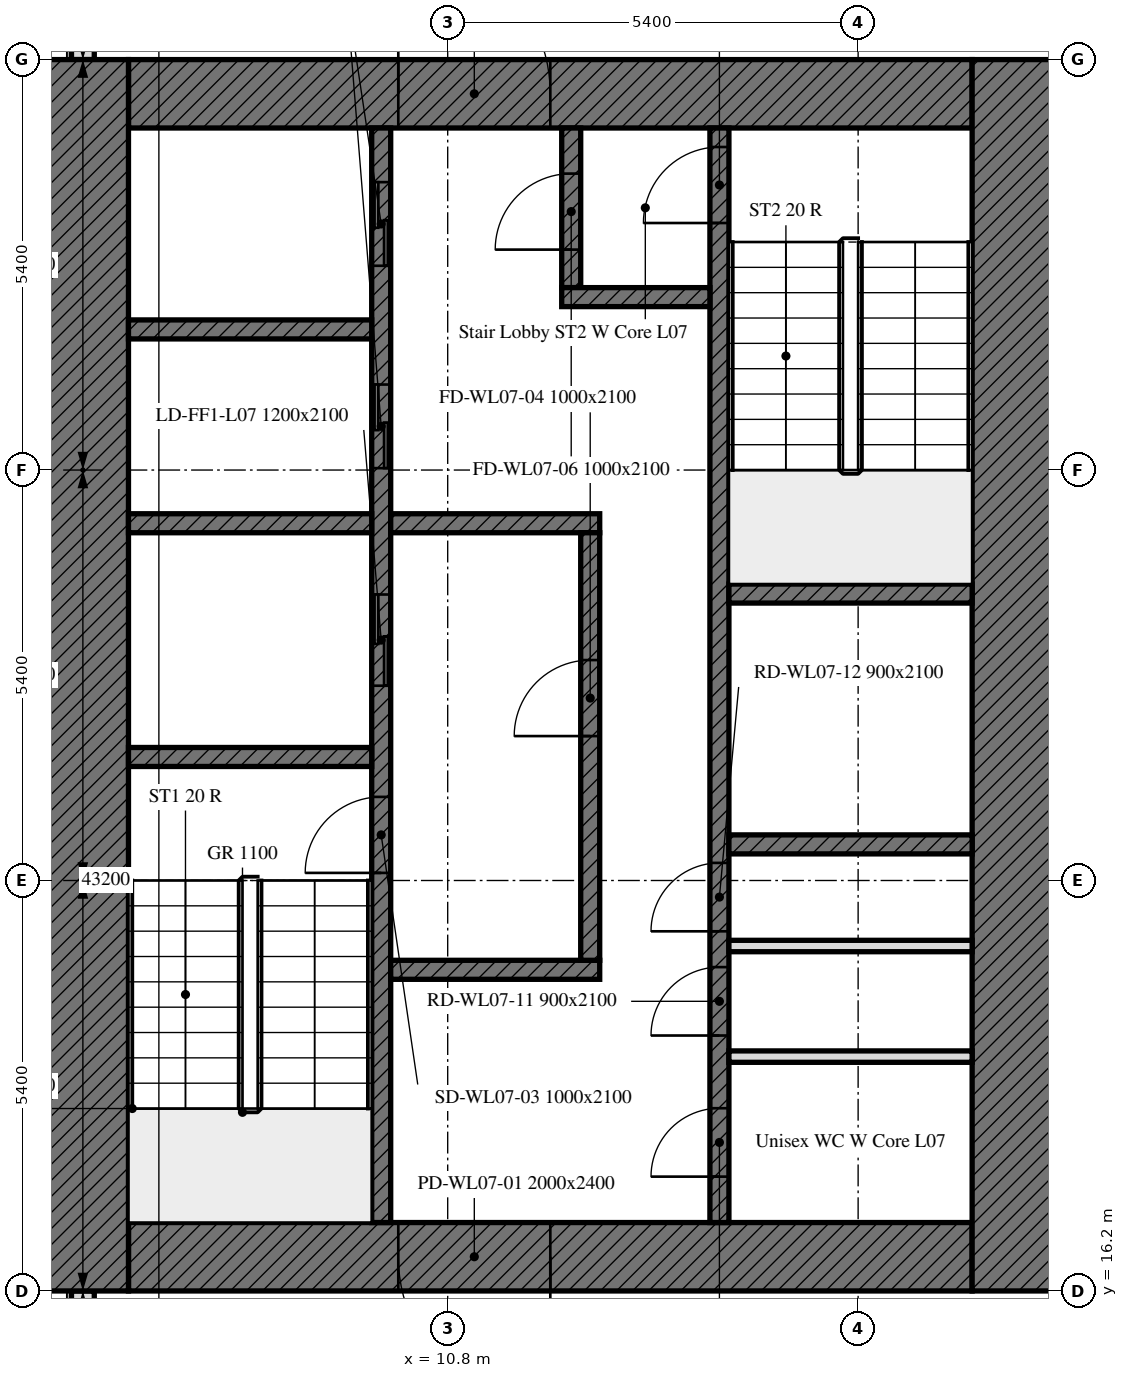
"""IFC4 building model, lengths in metres.
Left out: names, types, materials, properties, quantities, classifications, styles, units other than length and angle.
Written with IfcOpenShell. Run it as: python <this file> out.ifc"""

import sys

from ifc_helpers import new_model, si_unit, direction, frame, frame_2d, origin, place, context, subcontext, project, spatial, rectangle, extrude, element, fill, save


model = new_model("IFC4")
c1 = context("Model", 3, precision=1e-05, world=origin(), true_north=direction((0.0, 1.0)))
c2 = subcontext(c1, "Body", "Model", "MODEL_VIEW")
j1 = project(units=[si_unit("LENGTHUNIT", "METRE"), si_unit("PLANEANGLEUNIT", "RADIAN")], contexts=[c1])
p1 = place(None, origin())
s1 = spatial("IfcSite", under=j1, at=p1, CompositionType="ELEMENT")
p2 = place(p1, origin())
s2 = spatial("IfcBuilding", under=s1, at=p2, CompositionType="ELEMENT")
p3 = place(p2, frame((0.0, 0.0, 37.4)))
s3 = spatial("IfcBuildingStorey", under=s2, at=p3, CompositionType="ELEMENT", Elevation=37.4)
p4 = place(p3, frame((6.0, 37.614, 0.0), z_axis=(0.0, 0.0, 1.0), x_axis=(0.0, -1.0, 0.0)))
e1 = element("IfcWall", 1, at=p4, inside=s3, PredefinedType="SOLIDWALL", context=c2, shape_type="SweptSolid", body=[
    extrude(rectangle(XDim=5.214, YDim=0.3, at=frame_2d((2.607, 0.0))), origin(), (0.0, 0.0, 1.0), 3.5),
])
p5 = place(p3, frame((6.0, 16.2, 0.0), z_axis=(0.0, 0.0, 1.0), x_axis=(0.0, -1.0, 0.0)))
e2 = element("IfcWall", 2, at=p5, inside=s3, PredefinedType="SOLIDWALL", context=c2, shape_type="SweptSolid", body=[
    extrude(rectangle(XDim=10.614, YDim=0.3, at=frame_2d((5.307, 0.0))), origin(), (0.0, 0.0, 1.0), 3.5),
])
p6 = place(p5, frame((6.4, 0.0, 0.9)))
e3 = element("IfcOpeningElement", 3, at=p6, cuts=e2, PredefinedType="OPENING", context=c2, shape_type="SweptSolid", body=[
    extrude(rectangle(XDim=3.4, YDim=1.7, at=frame_2d((1.7, 0.85))), frame((0.0, 0.16, 0.0), z_axis=(0.0, -1.0, 0.0), x_axis=(1.0, 0.0, 0.0)), (0.0, 0.0, 1.0), 0.32),
])
p7 = place(p3, frame((17.7, 16.65, 0.0), z_axis=(0.0, 0.0, 1.0), x_axis=(-1.0, 0.0, 0.0)))
e4 = element("IfcWall", 4, at=p7, inside=s3, PredefinedType="SOLIDWALL", context=c2, shape_type="SweptSolid", body=[
    extrude(rectangle(XDim=11.1, YDim=0.9, at=frame_2d((5.55, 0.0))), origin(), (0.0, 0.0, 1.0), 3.5),
])
p8 = place(p7, frame((5.55, 0.0, 0.0)))
e5 = element("IfcOpeningElement", 5, at=p8, cuts=e4, PredefinedType="OPENING", context=c2, shape_type="SweptSolid", body=[
    extrude(rectangle(XDim=2.0, YDim=2.4, at=frame_2d((1.0, 1.2))), frame((0.0, 0.45, 0.0), z_axis=(0.0, -1.0, 0.0), x_axis=(1.0, 0.0, 0.0)), (0.0, 0.0, 1.0), 0.9),
])
p9 = place(p3, frame((6.6, 31.95, 0.0), z_axis=(0.0, 0.0, 1.0), x_axis=(1.0, 0.0, 0.0)))
e6 = element("IfcWall", 6, at=p9, inside=s3, PredefinedType="SOLIDWALL", context=c2, shape_type="SweptSolid", body=[
    extrude(rectangle(XDim=11.1, YDim=0.9, at=frame_2d((5.55, 0.0))), origin(), (0.0, 0.0, 1.0), 3.5),
])
p10 = place(p9, frame((3.55, 0.0, 0.0)))
e7 = element("IfcOpeningElement", 7, at=p10, cuts=e6, PredefinedType="OPENING", context=c2, shape_type="SweptSolid", body=[
    extrude(rectangle(XDim=2.0, YDim=2.4, at=frame_2d((1.0, 1.2))), frame((0.0, 0.45, 0.0), z_axis=(0.0, -1.0, 0.0), x_axis=(1.0, 0.0, 0.0)), (0.0, 0.0, 1.0), 0.9),
])
for number, where, z_axis, x_axis in (
    (8, (6.0, 16.2, 0.0), (0.0, 0.0, 1.0), (0.0, 1.0, 0.0)),
    (9, (18.3, 32.4, 0.0), (0.0, 0.0, 1.0), (0.0, -1.0, 0.0)),
):
    element("IfcWall", number, at=place(p3, frame(where, z_axis=z_axis, x_axis=x_axis)), inside=s3, PredefinedType="SOLIDWALL", context=c2, shape_type="SweptSolid", body=[
        extrude(rectangle(XDim=16.2, YDim=1.2, at=frame_2d((8.1, 0.0))), origin(), (0.0, 0.0, 1.0), 3.5),
    ])
p11 = place(p3, frame((9.925, 17.1, 0.0), z_axis=(0.0, 0.0, 1.0), x_axis=(0.0, 1.0, 0.0)))
e10 = element("IfcWall", 10, at=p11, inside=s3, PredefinedType="SOLIDWALL", context=c2, shape_type="SweptSolid", body=[
    extrude(rectangle(XDim=14.4, YDim=0.25, at=frame_2d((7.2, 0.0))), origin(), (0.0, 0.0, 1.0), 3.5),
])
p12 = place(p11, frame((4.6, 0.0, 0.0)))
e11 = element("IfcOpeningElement", 11, at=p12, cuts=e10, PredefinedType="OPENING", context=c2, shape_type="SweptSolid", body=[
    extrude(rectangle(XDim=1.0, YDim=2.1, at=frame_2d((0.5, 1.05))), frame((0.0, 0.125, 0.0), z_axis=(0.0, -1.0, 0.0), x_axis=(1.0, 0.0, 0.0)), (0.0, 0.0, 1.0), 0.25),
])
p13 = place(p11, frame((7.062, 0.0, 0.0)))
e12 = element("IfcOpeningElement", 12, at=p13, cuts=e10, PredefinedType="OPENING", context=c2, shape_type="SweptSolid", body=[
    extrude(rectangle(XDim=1.2, YDim=2.1, at=frame_2d((0.6, 1.05))), frame((0.0, 0.125, 0.0), z_axis=(0.0, -1.0, 0.0), x_axis=(1.0, 0.0, 0.0)), (0.0, 0.0, 1.0), 0.25),
])
p14 = place(p11, frame((9.925, 0.0, 0.0)))
e13 = element("IfcOpeningElement", 13, at=p14, cuts=e10, PredefinedType="OPENING", context=c2, shape_type="SweptSolid", body=[
    extrude(rectangle(XDim=1.1, YDim=2.1, at=frame_2d((0.55, 1.05))), frame((0.0, 0.125, 0.0), z_axis=(0.0, -1.0, 0.0), x_axis=(1.0, 0.0, 0.0)), (0.0, 0.0, 1.0), 0.25),
])
p15 = place(p11, frame((12.587, 0.0, 0.0)))
e14 = element("IfcOpeningElement", 14, at=p15, cuts=e10, PredefinedType="OPENING", context=c2, shape_type="SweptSolid", body=[
    extrude(rectangle(XDim=1.1, YDim=2.1, at=frame_2d((0.55, 1.05))), frame((0.0, 0.125, 0.0), z_axis=(0.0, -1.0, 0.0), x_axis=(1.0, 0.0, 0.0)), (0.0, 0.0, 1.0), 0.25),
])
p16 = place(p3, frame((14.375, 17.1, 0.0), z_axis=(0.0, 0.0, 1.0), x_axis=(0.0, 1.0, 0.0)))
e15 = element("IfcWall", 15, at=p16, inside=s3, PredefinedType="SOLIDWALL", context=c2, shape_type="SweptSolid", body=[
    extrude(rectangle(XDim=14.4, YDim=0.25, at=frame_2d((7.2, 0.0))), origin(), (0.0, 0.0, 1.0), 3.5),
])
p17 = place(p16, frame((13.15, 0.0, 0.0)))
e16 = element("IfcOpeningElement", 16, at=p17, cuts=e15, PredefinedType="OPENING", context=c2, shape_type="SweptSolid", body=[
    extrude(rectangle(XDim=1.0, YDim=2.1, at=frame_2d((0.5, 1.05))), frame((0.0, 0.125, 0.0), z_axis=(0.0, -1.0, 0.0), x_axis=(1.0, 0.0, 0.0)), (0.0, 0.0, 1.0), 0.25),
])
p18 = place(p16, frame((0.604, 0.0, 0.0)))
e17 = element("IfcOpeningElement", 17, at=p18, cuts=e15, PredefinedType="OPENING", context=c2, shape_type="SweptSolid", body=[
    extrude(rectangle(XDim=0.9, YDim=2.1, at=frame_2d((0.45, 1.05))), frame((0.0, 0.125, 0.0), z_axis=(0.0, -1.0, 0.0), x_axis=(1.0, 0.0, 0.0)), (0.0, 0.0, 1.0), 0.25),
])
p19 = place(p16, frame((2.46, 0.0, 0.0)))
e18 = element("IfcOpeningElement", 18, at=p19, cuts=e15, PredefinedType="OPENING", context=c2, shape_type="SweptSolid", body=[
    extrude(rectangle(XDim=0.9, YDim=2.1, at=frame_2d((0.45, 1.05))), frame((0.0, 0.125, 0.0), z_axis=(0.0, -1.0, 0.0), x_axis=(1.0, 0.0, 0.0)), (0.0, 0.0, 1.0), 0.25),
])
p20 = place(p16, frame((3.832, 0.0, 0.0)))
e19 = element("IfcOpeningElement", 19, at=p20, cuts=e15, PredefinedType="OPENING", context=c2, shape_type="SweptSolid", body=[
    extrude(rectangle(XDim=0.9, YDim=2.1, at=frame_2d((0.45, 1.05))), frame((0.0, 0.125, 0.0), z_axis=(0.0, -1.0, 0.0), x_axis=(1.0, 0.0, 0.0)), (0.0, 0.0, 1.0), 0.25),
])
for number, where, z_axis, x_axis in (
    (20, (6.6, 23.225, 0.0), (0.0, 0.0, 1.0), (1.0, 0.0, 0.0)),
    (21, (14.5, 25.375, 0.0), (0.0, 0.0, 1.0), (1.0, 0.0, 0.0)),
    (22, (14.5, 22.075, 0.0), (0.0, 0.0, 1.0), (1.0, 0.0, 0.0)),
    (23, (6.6, 26.3, 0.0), (0.0, 0.0, 1.0), (1.0, 0.0, 0.0)),
):
    element("IfcWall", number, at=place(p3, frame(where, z_axis=z_axis, x_axis=x_axis)), inside=s3, PredefinedType="SOLIDWALL", context=c2, shape_type="SweptSolid", body=[
        extrude(rectangle(XDim=3.2, YDim=0.25, at=frame_2d((1.6, 0.0))), origin(), (0.0, 0.0, 1.0), 3.5),
    ])
for number, where, z_axis, x_axis in (
    (24, (10.05, 26.3, 0.0), (0.0, 0.0, 1.0), (1.0, 0.0, 0.0)),
    (25, (10.05, 20.425, 0.0), (0.0, 0.0, 1.0), (1.0, 0.0, 0.0)),
):
    element("IfcWall", number, at=place(p3, frame(where, z_axis=z_axis, x_axis=x_axis)), inside=s3, PredefinedType="SOLIDWALL", context=c2, shape_type="SweptSolid", body=[
        extrude(rectangle(XDim=2.75, YDim=0.25, at=frame_2d((1.375, 0.0))), origin(), (0.0, 0.0, 1.0), 3.5),
    ])
p21 = place(p3, frame((12.425, 29.4, 0.0), z_axis=(0.0, 0.0, 1.0), x_axis=(0.0, 1.0, 0.0)))
e26 = element("IfcWall", 26, at=p21, inside=s3, PredefinedType="SOLIDWALL", context=c2, shape_type="SweptSolid", body=[
    extrude(rectangle(XDim=2.1, YDim=0.25, at=frame_2d((1.05, 0.0))), origin(), (0.0, 0.0, 1.0), 3.5),
])
p22 = place(p21, frame((0.5, 0.0, 0.0)))
e27 = element("IfcOpeningElement", 27, at=p22, cuts=e26, PredefinedType="OPENING", context=c2, shape_type="SweptSolid", body=[
    extrude(rectangle(XDim=1.0, YDim=2.1, at=frame_2d((0.5, 1.05))), frame((0.0, 0.125, 0.0), z_axis=(0.0, -1.0, 0.0), x_axis=(1.0, 0.0, 0.0)), (0.0, 0.0, 1.0), 0.25),
])
p23 = place(p3, frame((12.3, 29.275, 0.0), z_axis=(0.0, 0.0, 1.0), x_axis=(1.0, 0.0, 0.0)))
e28 = element("IfcWall", 28, at=p23, inside=s3, PredefinedType="SOLIDWALL", context=c2, shape_type="SweptSolid", body=[
    extrude(rectangle(XDim=1.95, YDim=0.25, at=frame_2d((0.975, 0.0))), origin(), (0.0, 0.0, 1.0), 3.5),
])
p24 = place(p3, frame((12.675, 20.55, 0.0), z_axis=(0.0, 0.0, 1.0), x_axis=(0.0, 1.0, 0.0)))
e29 = element("IfcWall", 29, at=p24, inside=s3, PredefinedType="SOLIDWALL", context=c2, shape_type="SweptSolid", body=[
    extrude(rectangle(XDim=5.625, YDim=0.25, at=frame_2d((2.812, 0.0))), origin(), (0.0, 0.0, 1.0), 3.5),
])
p25 = place(p24, frame((2.95, 0.0, 0.0)))
e30 = element("IfcOpeningElement", 30, at=p25, cuts=e29, PredefinedType="OPENING", context=c2, shape_type="SweptSolid", body=[
    extrude(rectangle(XDim=1.0, YDim=2.1, at=frame_2d((0.5, 1.05))), frame((0.0, 0.125, 0.0), z_axis=(0.0, -1.0, 0.0), x_axis=(1.0, 0.0, 0.0)), (0.0, 0.0, 1.0), 0.25),
])
p26 = place(p3, frame((6.6, 28.85, 0.0), z_axis=(0.0, 0.0, 1.0), x_axis=(1.0, 0.0, 0.0)))
e31 = element("IfcWall", 31, at=p26, inside=s3, PredefinedType="SOLIDWALL", context=c2, shape_type="SweptSolid", body=[
    extrude(rectangle(XDim=3.2, YDim=0.25, at=frame_2d((1.6, 0.0))), origin(), (0.0, 0.0, 1.0), 3.5),
])
for number, where, z_axis, x_axis in (
    (32, (14.5, 19.283, 0.0), (0.0, 0.0, 1.0), (1.0, 0.0, 0.0)),
    (33, (14.5, 20.738, 0.0), (0.0, 0.0, 1.0), (1.0, 0.0, 0.0)),
):
    element("IfcWall", number, at=place(p3, frame(where, z_axis=z_axis, x_axis=x_axis)), inside=s3, PredefinedType="PARTITIONING", context=c2, shape_type="SweptSolid", body=[
        extrude(rectangle(XDim=3.2, YDim=0.15, at=frame_2d((1.6, 0.0))), origin(), (0.0, 0.0, 1.0), 3.5),
    ])
p27 = place(p8, origin())
e34 = element("IfcDoor", 34, at=p27, inside=s3, OperationType="DOUBLE_DOOR_SINGLE_SWING", PredefinedType="DOOR", context=c2, shape_type="SweptSolid", body=[
    extrude(rectangle(XDim=2.0, YDim=2.4, at=frame_2d((1.0, 1.2))), frame((0.0, 0.025, 0.0), z_axis=(0.0, -1.0, 0.0), x_axis=(1.0, 0.0, 0.0)), (0.0, 0.0, 1.0), 0.05),
])
fill(e5, e34)
p28 = place(p10, origin())
e35 = element("IfcDoor", 35, at=p28, inside=s3, OperationType="DOUBLE_DOOR_SINGLE_SWING", PredefinedType="DOOR", context=c2, shape_type="SweptSolid", body=[
    extrude(rectangle(XDim=2.0, YDim=2.4, at=frame_2d((1.0, 1.2))), frame((0.0, 0.025, 0.0), z_axis=(0.0, -1.0, 0.0), x_axis=(1.0, 0.0, 0.0)), (0.0, 0.0, 1.0), 0.05),
])
fill(e7, e35)
p29 = place(p12, origin())
e36 = element("IfcDoor", 36, at=p29, inside=s3, OperationType="SINGLE_SWING_LEFT", PredefinedType="DOOR", context=c2, shape_type="SweptSolid", body=[
    extrude(rectangle(XDim=1.0, YDim=2.1, at=frame_2d((0.5, 1.05))), frame((0.0, 0.025, 0.0), z_axis=(0.0, -1.0, 0.0), x_axis=(1.0, 0.0, 0.0)), (0.0, 0.0, 1.0), 0.05),
])
fill(e11, e36)
p30 = place(p25, origin())
e37 = element("IfcDoor", 37, at=p30, inside=s3, OperationType="SINGLE_SWING_LEFT", PredefinedType="DOOR", context=c2, shape_type="SweptSolid", body=[
    extrude(rectangle(XDim=1.0, YDim=2.1, at=frame_2d((0.5, 1.05))), frame((0.0, 0.025, 0.0), z_axis=(0.0, -1.0, 0.0), x_axis=(1.0, 0.0, 0.0)), (0.0, 0.0, 1.0), 0.05),
])
fill(e30, e37)
p31 = place(p17, origin())
e38 = element("IfcDoor", 38, at=p31, inside=s3, OperationType="SINGLE_SWING_LEFT", PredefinedType="DOOR", context=c2, shape_type="SweptSolid", body=[
    extrude(rectangle(XDim=1.0, YDim=2.1, at=frame_2d((0.5, 1.05))), frame((0.0, 0.025, 0.0), z_axis=(0.0, -1.0, 0.0), x_axis=(1.0, 0.0, 0.0)), (0.0, 0.0, 1.0), 0.05),
])
fill(e16, e38)
p32 = place(p22, origin())
e39 = element("IfcDoor", 39, at=p32, inside=s3, OperationType="SINGLE_SWING_LEFT", PredefinedType="DOOR", context=c2, shape_type="SweptSolid", body=[
    extrude(rectangle(XDim=1.0, YDim=2.1, at=frame_2d((0.5, 1.05))), frame((0.0, 0.025, 0.0), z_axis=(0.0, -1.0, 0.0), x_axis=(1.0, 0.0, 0.0)), (0.0, 0.0, 1.0), 0.05),
])
fill(e27, e39)
p33 = place(p13, origin())
e40 = element("IfcDoor", 40, at=p33, inside=s3, OperationType="DOUBLE_DOOR_SLIDING", PredefinedType="DOOR", context=c2, shape_type="SweptSolid", body=[
    extrude(rectangle(XDim=1.2, YDim=2.1, at=frame_2d((0.6, 1.05))), frame((0.0, 0.025, 0.0), z_axis=(0.0, -1.0, 0.0), x_axis=(1.0, 0.0, 0.0)), (0.0, 0.0, 1.0), 0.05),
])
fill(e12, e40)
p34 = place(p14, origin())
e41 = element("IfcDoor", 41, at=p34, inside=s3, OperationType="DOUBLE_DOOR_SLIDING", PredefinedType="DOOR", context=c2, shape_type="SweptSolid", body=[
    extrude(rectangle(XDim=1.1, YDim=2.1, at=frame_2d((0.55, 1.05))), frame((0.0, 0.025, 0.0), z_axis=(0.0, -1.0, 0.0), x_axis=(1.0, 0.0, 0.0)), (0.0, 0.0, 1.0), 0.05),
])
fill(e13, e41)
p35 = place(p15, origin())
e42 = element("IfcDoor", 42, at=p35, inside=s3, OperationType="DOUBLE_DOOR_SLIDING", PredefinedType="DOOR", context=c2, shape_type="SweptSolid", body=[
    extrude(rectangle(XDim=1.1, YDim=2.1, at=frame_2d((0.55, 1.05))), frame((0.0, 0.025, 0.0), z_axis=(0.0, -1.0, 0.0), x_axis=(1.0, 0.0, 0.0)), (0.0, 0.0, 1.0), 0.05),
])
fill(e14, e42)
p36 = place(p18, origin())
e43 = element("IfcDoor", 43, at=p36, inside=s3, OperationType="SINGLE_SWING_LEFT", PredefinedType="DOOR", context=c2, shape_type="SweptSolid", body=[
    extrude(rectangle(XDim=0.9, YDim=2.1, at=frame_2d((0.45, 1.05))), frame((0.0, 0.025, 0.0), z_axis=(0.0, -1.0, 0.0), x_axis=(1.0, 0.0, 0.0)), (0.0, 0.0, 1.0), 0.05),
])
fill(e17, e43)
p37 = place(p19, origin())
e44 = element("IfcDoor", 44, at=p37, inside=s3, OperationType="SINGLE_SWING_LEFT", PredefinedType="DOOR", context=c2, shape_type="SweptSolid", body=[
    extrude(rectangle(XDim=0.9, YDim=2.1, at=frame_2d((0.45, 1.05))), frame((0.0, 0.025, 0.0), z_axis=(0.0, -1.0, 0.0), x_axis=(1.0, 0.0, 0.0)), (0.0, 0.0, 1.0), 0.05),
])
fill(e18, e44)
p38 = place(p20, origin())
e45 = element("IfcDoor", 45, at=p38, inside=s3, OperationType="SINGLE_SWING_LEFT", PredefinedType="DOOR", context=c2, shape_type="SweptSolid", body=[
    extrude(rectangle(XDim=0.9, YDim=2.1, at=frame_2d((0.45, 1.05))), frame((0.0, 0.025, 0.0), z_axis=(0.0, -1.0, 0.0), x_axis=(1.0, 0.0, 0.0)), (0.0, 0.0, 1.0), 0.05),
])
fill(e19, e45)
save(model, sys.argv[1])
